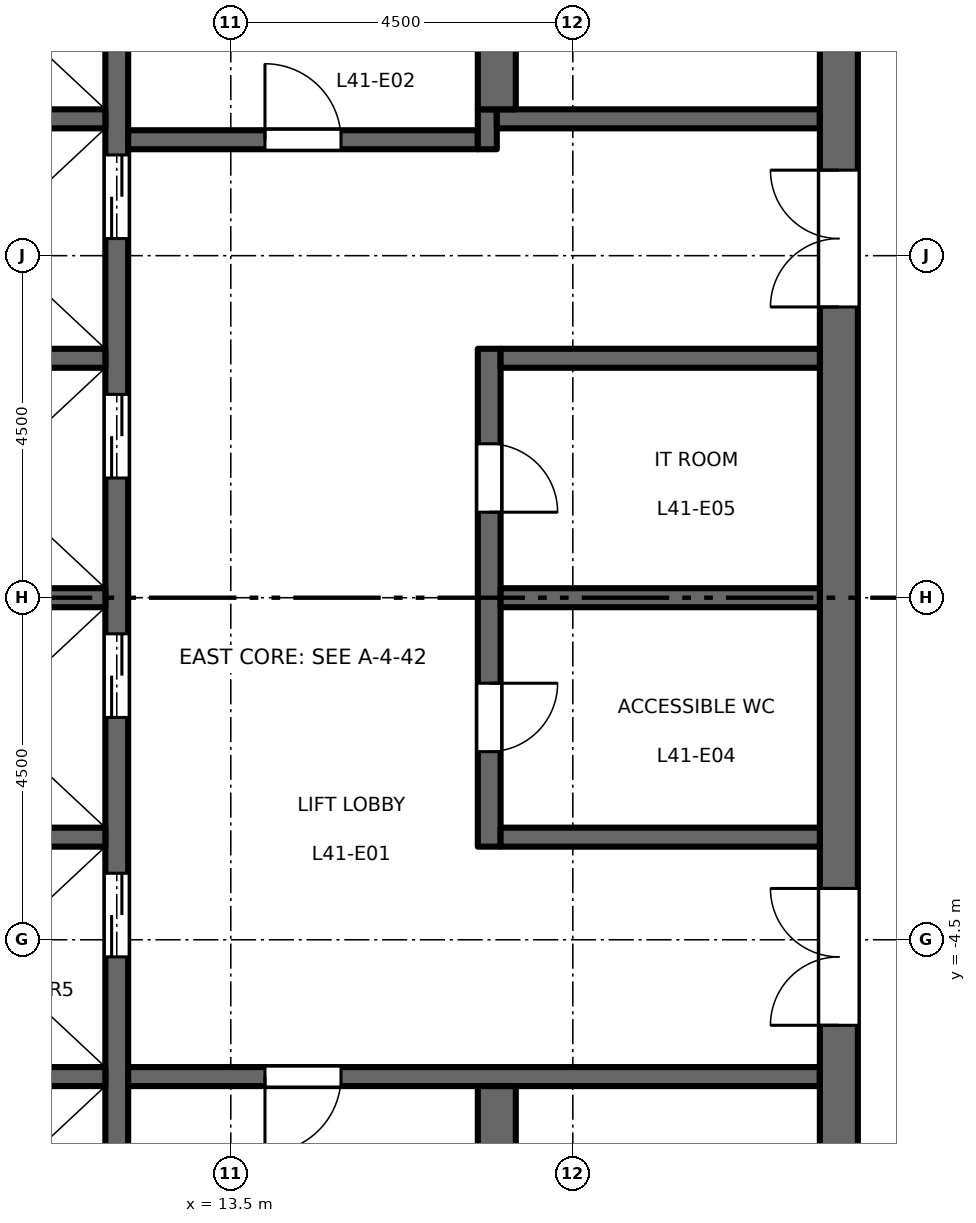
"""IFC4 building model, lengths in metres.
Left out: names, types, materials, properties, quantities, classifications, styles, units other than length and angle.
Written with IfcOpenShell. Run it as: python <this file> out.ifc"""

import sys

from ifc_helpers import new_model, si_unit, direction, frame, frame_2d, origin, place, context, subcontext, project, spatial, rectangle, extrude, element, fill, save


model = new_model("IFC4")
c1 = context("Model", 3, precision=1e-05, world=origin(), true_north=direction((0.0, 1.0)))
c2 = subcontext(c1, "Body", "Model", "MODEL_VIEW")
j1 = project(units=[si_unit("LENGTHUNIT", "METRE"), si_unit("PLANEANGLEUNIT", "RADIAN")], contexts=[c1])
p1 = place(None, origin())
s1 = spatial("IfcSite", under=j1, at=p1, CompositionType="ELEMENT")
p2 = place(p1, origin())
s2 = spatial("IfcBuilding", under=s1, at=p2, CompositionType="ELEMENT")
p3 = place(p2, frame((0.0, 0.0, 192.7)))
s3 = spatial("IfcBuildingStorey", under=s2, at=p3, CompositionType="ELEMENT", Elevation=192.7)
p4 = place(p3, frame((12.0, -9.45, 0.0), z_axis=(0.0, 0.0, 1.0), x_axis=(0.0, 1.0, 0.0)))
e1 = element("IfcWall", 1, at=p4, inside=s3, PredefinedType="SHEAR", context=c2, shape_type="SweptSolid", body=[
    extrude(rectangle(XDim=18.9, YDim=0.3, at=frame_2d((9.45, 0.0))), origin(), (0.0, 0.0, 1.0), 4.35),
])
p5 = place(p4, frame((4.725, 0.0, 0.0)))
e2 = element("IfcOpeningElement", 2, at=p5, cuts=e1, PredefinedType="OPENING", context=c2, shape_type="SweptSolid", body=[
    extrude(rectangle(XDim=1.1, YDim=2.1, at=frame_2d((0.55, 1.05))), frame((0.0, 0.16, 0.0), z_axis=(0.0, -1.0, 0.0), x_axis=(1.0, 0.0, 0.0)), (0.0, 0.0, 1.0), 0.32),
])
p6 = place(p4, frame((7.875, 0.0, 0.0)))
e3 = element("IfcOpeningElement", 3, at=p6, cuts=e1, PredefinedType="OPENING", context=c2, shape_type="SweptSolid", body=[
    extrude(rectangle(XDim=1.1, YDim=2.1, at=frame_2d((0.55, 1.05))), frame((0.0, 0.16, 0.0), z_axis=(0.0, -1.0, 0.0), x_axis=(1.0, 0.0, 0.0)), (0.0, 0.0, 1.0), 0.32),
])
p7 = place(p4, frame((11.025, 0.0, 0.0)))
e4 = element("IfcOpeningElement", 4, at=p7, cuts=e1, PredefinedType="OPENING", context=c2, shape_type="SweptSolid", body=[
    extrude(rectangle(XDim=1.1, YDim=2.1, at=frame_2d((0.55, 1.05))), frame((0.0, 0.16, 0.0), z_axis=(0.0, -1.0, 0.0), x_axis=(1.0, 0.0, 0.0)), (0.0, 0.0, 1.0), 0.32),
])
p8 = place(p4, frame((14.175, 0.0, 0.0)))
e5 = element("IfcOpeningElement", 5, at=p8, cuts=e1, PredefinedType="OPENING", context=c2, shape_type="SweptSolid", body=[
    extrude(rectangle(XDim=1.1, YDim=2.1, at=frame_2d((0.55, 1.05))), frame((0.0, 0.16, 0.0), z_axis=(0.0, -1.0, 0.0), x_axis=(1.0, 0.0, 0.0)), (0.0, 0.0, 1.0), 0.32),
])
p9 = place(p4, frame((16.725, 0.0, 0.0)))
e6 = element("IfcOpeningElement", 6, at=p9, cuts=e1, PredefinedType="OPENING", context=c2, shape_type="SweptSolid", body=[
    extrude(rectangle(XDim=1.2, YDim=2.1, at=frame_2d((0.6, 1.05))), frame((0.0, 0.16, 0.0), z_axis=(0.0, -1.0, 0.0), x_axis=(1.0, 0.0, 0.0)), (0.0, 0.0, 1.0), 0.32),
])
p10 = place(p4, frame((0.975, 0.0, 0.0)))
e7 = element("IfcOpeningElement", 7, at=p10, cuts=e1, PredefinedType="OPENING", context=c2, shape_type="SweptSolid", body=[
    extrude(rectangle(XDim=1.2, YDim=2.1, at=frame_2d((0.6, 1.05))), frame((0.0, 0.16, 0.0), z_axis=(0.0, -1.0, 0.0), x_axis=(1.0, 0.0, 0.0)), (0.0, 0.0, 1.0), 0.32),
])
p11 = place(p3, frame((12.15, 6.025, 0.0), z_axis=(0.0, 0.0, 1.0), x_axis=(1.0, 0.0, 0.0)))
e8 = element("IfcWall", 8, at=p11, inside=s3, PredefinedType="SHEAR", context=c2, shape_type="SweptSolid", body=[
    extrude(rectangle(XDim=4.6, YDim=0.25, at=frame_2d((2.3, 0.0))), origin(), (0.0, 0.0, 1.0), 4.35),
])
p12 = place(p11, frame((1.8, 0.0, 0.0)))
e9 = element("IfcOpeningElement", 9, at=p12, cuts=e8, PredefinedType="OPENING", context=c2, shape_type="SweptSolid", body=[
    extrude(rectangle(XDim=1.0, YDim=2.1, at=frame_2d((0.5, 1.05))), frame((0.0, 0.135, 0.0), z_axis=(0.0, -1.0, 0.0), x_axis=(1.0, 0.0, 0.0)), (0.0, 0.0, 1.0), 0.27),
])
p13 = place(p3, frame((16.875, 5.9, 0.0), z_axis=(0.0, 0.0, 1.0), x_axis=(0.0, 1.0, 0.0)))
e10 = element("IfcWall", 10, at=p13, inside=s3, PredefinedType="SHEAR", context=c2, shape_type="SweptSolid", body=[
    extrude(rectangle(XDim=0.525, YDim=0.25, at=frame_2d((0.263, 0.0))), origin(), (0.0, 0.0, 1.0), 4.35),
])
p14 = place(p3, frame((17.0, 6.3, 0.0), z_axis=(0.0, 0.0, 1.0), x_axis=(1.0, 0.0, 0.0)))
e11 = element("IfcWall", 11, at=p14, inside=s3, PredefinedType="SHEAR", context=c2, shape_type="SweptSolid", body=[
    extrude(rectangle(XDim=4.25, YDim=0.25, at=frame_2d((2.125, 0.0))), origin(), (0.0, 0.0, 1.0), 4.35),
])
p15 = place(p3, frame((12.15, -6.3, 0.0), z_axis=(0.0, 0.0, 1.0), x_axis=(1.0, 0.0, 0.0)))
e12 = element("IfcWall", 12, at=p15, inside=s3, PredefinedType="SHEAR", context=c2, shape_type="SweptSolid", body=[
    extrude(rectangle(XDim=9.1, YDim=0.25, at=frame_2d((4.55, 0.0))), origin(), (0.0, 0.0, 1.0), 4.35),
])
p16 = place(p15, frame((1.8, 0.0, 0.0)))
e13 = element("IfcOpeningElement", 13, at=p16, cuts=e12, PredefinedType="OPENING", context=c2, shape_type="SweptSolid", body=[
    extrude(rectangle(XDim=1.0, YDim=2.1, at=frame_2d((0.5, 1.05))), frame((0.0, 0.135, 0.0), z_axis=(0.0, -1.0, 0.0), x_axis=(1.0, 0.0, 0.0)), (0.0, 0.0, 1.0), 0.27),
])
p17 = place(p3, frame((21.5, -13.0, 0.0), z_axis=(0.0, 0.0, 1.0), x_axis=(0.0, 1.0, 0.0)))
e14 = element("IfcWall", 14, at=p17, inside=s3, PredefinedType="SHEAR", context=c2, shape_type="SweptSolid", body=[
    extrude(rectangle(XDim=26.0, YDim=0.5, at=frame_2d((13.0, 0.0))), origin(), (0.0, 0.0, 1.0), 4.35),
])
p18 = place(p17, frame((16.825, 0.0, 0.0)))
e15 = element("IfcOpeningElement", 15, at=p18, cuts=e14, PredefinedType="OPENING", context=c2, shape_type="SweptSolid", body=[
    extrude(rectangle(XDim=1.8, YDim=2.1, at=frame_2d((0.9, 1.05))), frame((0.0, 0.26, 0.0), z_axis=(0.0, -1.0, 0.0), x_axis=(1.0, 0.0, 0.0)), (0.0, 0.0, 1.0), 0.52),
])
p19 = place(p17, frame((7.375, 0.0, 0.0)))
e16 = element("IfcOpeningElement", 16, at=p19, cuts=e14, PredefinedType="OPENING", context=c2, shape_type="SweptSolid", body=[
    extrude(rectangle(XDim=1.8, YDim=2.1, at=frame_2d((0.9, 1.05))), frame((0.0, 0.26, 0.0), z_axis=(0.0, -1.0, 0.0), x_axis=(1.0, 0.0, 0.0)), (0.0, 0.0, 1.0), 0.52),
])
p20 = place(p3, frame((16.9, -3.275, 0.0), z_axis=(0.0, 0.0, 1.0), x_axis=(0.0, 1.0, 0.0)))
e17 = element("IfcWall", 17, at=p20, inside=s3, PredefinedType="SHEAR", context=c2, shape_type="SweptSolid", body=[
    extrude(rectangle(XDim=6.55, YDim=0.3, at=frame_2d((3.275, 0.0))), origin(), (0.0, 0.0, 1.0), 4.35),
])
p21 = place(p20, frame((1.25, 0.0, 0.0)))
e18 = element("IfcOpeningElement", 18, at=p21, cuts=e17, PredefinedType="OPENING", context=c2, shape_type="SweptSolid", body=[
    extrude(rectangle(XDim=0.9, YDim=2.1, at=frame_2d((0.45, 1.05))), frame((0.0, 0.16, 0.0), z_axis=(0.0, -1.0, 0.0), x_axis=(1.0, 0.0, 0.0)), (0.0, 0.0, 1.0), 0.32),
])
p22 = place(p20, frame((4.4, 0.0, 0.0)))
e19 = element("IfcOpeningElement", 19, at=p22, cuts=e17, PredefinedType="OPENING", context=c2, shape_type="SweptSolid", body=[
    extrude(rectangle(XDim=0.9, YDim=2.1, at=frame_2d((0.45, 1.05))), frame((0.0, 0.16, 0.0), z_axis=(0.0, -1.0, 0.0), x_axis=(1.0, 0.0, 0.0)), (0.0, 0.0, 1.0), 0.32),
])
for number, where, z_axis, x_axis in (
    (20, (17.05, 0.0, 0.0), (0.0, 0.0, 1.0), (1.0, 0.0, 0.0)),
    (21, (17.05, 3.15, 0.0), (0.0, 0.0, 1.0), (1.0, 0.0, 0.0)),
    (22, (17.05, -3.15, 0.0), (0.0, 0.0, 1.0), (1.0, 0.0, 0.0)),
):
    element("IfcWall", number, at=place(p3, frame(where, z_axis=z_axis, x_axis=x_axis)), inside=s3, PredefinedType="SHEAR", context=c2, shape_type="SweptSolid", body=[
        extrude(rectangle(XDim=4.2, YDim=0.25, at=frame_2d((2.1, 0.0))), origin(), (0.0, 0.0, 1.0), 4.35),
    ])
for number, where, z_axis, x_axis in (
    (23, (17.0, 6.425, 0.0), (0.0, 0.0, 1.0), (0.0, 1.0, 0.0)),
    (24, (17.0, -13.0, 0.0), (0.0, 0.0, 1.0), (0.0, 1.0, 0.0)),
):
    element("IfcWall", number, at=place(p3, frame(where, z_axis=z_axis, x_axis=x_axis)), inside=s3, PredefinedType="SHEAR", context=c2, shape_type="SweptSolid", body=[
        extrude(rectangle(XDim=6.575, YDim=0.5, at=frame_2d((3.288, 0.0))), origin(), (0.0, 0.0, 1.0), 4.35),
    ])
for number, where, z_axis, x_axis in (
    (25, (8.75, 0.0, 0.0), (0.0, 0.0, 1.0), (1.0, 0.0, 0.0)),
    (26, (8.75, 3.15, 0.0), (0.0, 0.0, 1.0), (1.0, 0.0, 0.0)),
    (27, (8.75, 6.3, 0.0), (0.0, 0.0, 1.0), (1.0, 0.0, 0.0)),
    (28, (8.75, -3.15, 0.0), (0.0, 0.0, 1.0), (1.0, 0.0, 0.0)),
    (29, (8.75, -6.3, 0.0), (0.0, 0.0, 1.0), (1.0, 0.0, 0.0)),
):
    element("IfcWall", number, at=place(p3, frame(where, z_axis=z_axis, x_axis=x_axis)), inside=s3, PredefinedType="SHEAR", context=c2, shape_type="SweptSolid", body=[
        extrude(rectangle(XDim=3.1, YDim=0.25, at=frame_2d((1.55, 0.0))), origin(), (0.0, 0.0, 1.0), 4.35),
    ])
p23 = place(p12, origin())
e30 = element("IfcDoor", 30, at=p23, inside=s3, OperationType="SINGLE_SWING_RIGHT", PredefinedType="DOOR", context=c2, shape_type="SweptSolid", body=[
    extrude(rectangle(XDim=1.0, YDim=2.1, at=frame_2d((0.5, 1.05))), frame((0.0, 0.025, 0.0), z_axis=(0.0, -1.0, 0.0), x_axis=(1.0, 0.0, 0.0)), (0.0, 0.0, 1.0), 0.05),
])
fill(e9, e30)
p24 = place(p16, origin())
e31 = element("IfcDoor", 31, at=p24, inside=s3, OperationType="SINGLE_SWING_LEFT", PredefinedType="DOOR", context=c2, shape_type="SweptSolid", body=[
    extrude(rectangle(XDim=1.0, YDim=2.1, at=frame_2d((0.5, 1.05))), frame((0.0, 0.025, 0.0), z_axis=(0.0, -1.0, 0.0), x_axis=(1.0, 0.0, 0.0)), (0.0, 0.0, 1.0), 0.05),
])
fill(e13, e31)
p25 = place(p18, origin())
e32 = element("IfcDoor", 32, at=p25, inside=s3, OperationType="DOUBLE_DOOR_DOUBLE_SWING", PredefinedType="DOOR", context=c2, shape_type="SweptSolid", body=[
    extrude(rectangle(XDim=1.8, YDim=2.1, at=frame_2d((0.9, 1.05))), frame((0.0, 0.025, 0.0), z_axis=(0.0, -1.0, 0.0), x_axis=(1.0, 0.0, 0.0)), (0.0, 0.0, 1.0), 0.05),
])
fill(e15, e32)
p26 = place(p19, origin())
e33 = element("IfcDoor", 33, at=p26, inside=s3, OperationType="DOUBLE_DOOR_DOUBLE_SWING", PredefinedType="DOOR", context=c2, shape_type="SweptSolid", body=[
    extrude(rectangle(XDim=1.8, YDim=2.1, at=frame_2d((0.9, 1.05))), frame((0.0, 0.025, 0.0), z_axis=(0.0, -1.0, 0.0), x_axis=(1.0, 0.0, 0.0)), (0.0, 0.0, 1.0), 0.05),
])
fill(e16, e33)
p27 = place(p5, origin())
e34 = element("IfcDoor", 34, at=p27, inside=s3, OperationType="DOUBLE_DOOR_SLIDING", PredefinedType="DOOR", context=c2, shape_type="SweptSolid", body=[
    extrude(rectangle(XDim=1.1, YDim=2.1, at=frame_2d((0.55, 1.05))), frame((0.0, 0.025, 0.0), z_axis=(0.0, -1.0, 0.0), x_axis=(1.0, 0.0, 0.0)), (0.0, 0.0, 1.0), 0.05),
])
fill(e2, e34)
p28 = place(p6, origin())
e35 = element("IfcDoor", 35, at=p28, inside=s3, OperationType="DOUBLE_DOOR_SLIDING", PredefinedType="DOOR", context=c2, shape_type="SweptSolid", body=[
    extrude(rectangle(XDim=1.1, YDim=2.1, at=frame_2d((0.55, 1.05))), frame((0.0, 0.025, 0.0), z_axis=(0.0, -1.0, 0.0), x_axis=(1.0, 0.0, 0.0)), (0.0, 0.0, 1.0), 0.05),
])
fill(e3, e35)
p29 = place(p7, origin())
e36 = element("IfcDoor", 36, at=p29, inside=s3, OperationType="DOUBLE_DOOR_SLIDING", PredefinedType="DOOR", context=c2, shape_type="SweptSolid", body=[
    extrude(rectangle(XDim=1.1, YDim=2.1, at=frame_2d((0.55, 1.05))), frame((0.0, 0.025, 0.0), z_axis=(0.0, -1.0, 0.0), x_axis=(1.0, 0.0, 0.0)), (0.0, 0.0, 1.0), 0.05),
])
fill(e4, e36)
p30 = place(p8, origin())
e37 = element("IfcDoor", 37, at=p30, inside=s3, OperationType="DOUBLE_DOOR_SLIDING", PredefinedType="DOOR", context=c2, shape_type="SweptSolid", body=[
    extrude(rectangle(XDim=1.1, YDim=2.1, at=frame_2d((0.55, 1.05))), frame((0.0, 0.025, 0.0), z_axis=(0.0, -1.0, 0.0), x_axis=(1.0, 0.0, 0.0)), (0.0, 0.0, 1.0), 0.05),
])
fill(e5, e37)
p31 = place(p21, origin())
e38 = element("IfcDoor", 38, at=p31, inside=s3, OperationType="SINGLE_SWING_RIGHT", PredefinedType="DOOR", context=c2, shape_type="SweptSolid", body=[
    extrude(rectangle(XDim=0.9, YDim=2.1, at=frame_2d((0.45, 1.05))), frame((0.0, 0.025, 0.0), z_axis=(0.0, -1.0, 0.0), x_axis=(1.0, 0.0, 0.0)), (0.0, 0.0, 1.0), 0.05),
])
fill(e18, e38)
p32 = place(p22, origin())
e39 = element("IfcDoor", 39, at=p32, inside=s3, OperationType="SINGLE_SWING_LEFT", PredefinedType="DOOR", context=c2, shape_type="SweptSolid", body=[
    extrude(rectangle(XDim=0.9, YDim=2.1, at=frame_2d((0.45, 1.05))), frame((0.0, 0.025, 0.0), z_axis=(0.0, -1.0, 0.0), x_axis=(1.0, 0.0, 0.0)), (0.0, 0.0, 1.0), 0.05),
])
fill(e19, e39)
save(model, sys.argv[1])
